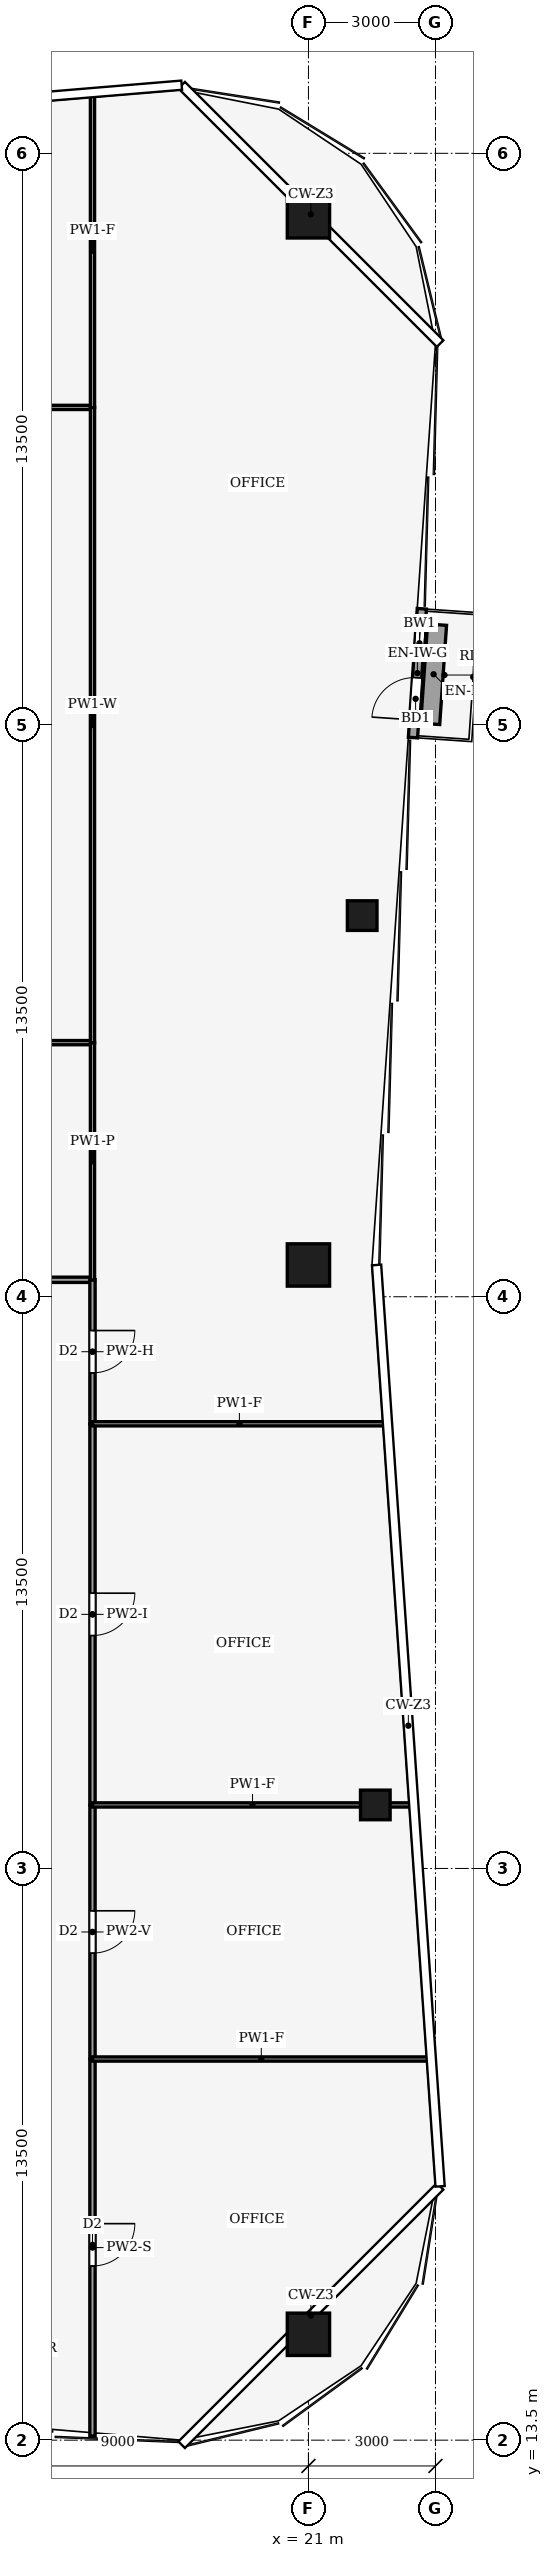
"""IFC4 building model, lengths in metres.
Left out: names, types, materials, properties, quantities, classifications, styles, units other than length and angle.
Written with IfcOpenShell. Run it as: python <this file> out.ifc"""

import sys

from ifc_helpers import new_model, si_unit, direction, frame, frame_2d, origin, origin_2d, place, context, subcontext, project, spatial, rectangle, hollow_rectangle, extrude, element, fill, save


model = new_model("IFC4")
c1 = context("Model", 3, precision=1e-05, world=origin(), true_north=direction((0.0, 1.0)))
c2 = subcontext(c1, "Body", "Model", "MODEL_VIEW")
j1 = project(units=[si_unit("LENGTHUNIT", "METRE"), si_unit("PLANEANGLEUNIT", "RADIAN")], contexts=[c1])
p1 = place(None, origin())
s1 = spatial("IfcSite", under=j1, at=p1, CompositionType="ELEMENT")
p2 = place(p1, origin())
s2 = spatial("IfcBuilding", under=s1, at=p2, CompositionType="ELEMENT")
p3 = place(p2, frame((0.0, 0.0, 198.0)))
s3 = spatial("IfcBuildingStorey", under=s2, at=p3, CompositionType="ELEMENT", Elevation=198.0)
for number, where, z_axis, x_axis in (
    (1, (21.0, 66.0, 0.0), (0.0, 0.0, 1.0), (1.0, 0.0, 0.0)),
    (2, (21.0, 41.25, 0.0), (0.0, 0.0, 1.0), (1.0, 0.0, 0.0)),
    (3, (21.0, 16.0, 0.0), (0.0, 0.0, 1.0), (1.0, 0.0, 0.0)),
):
    element("IfcColumn", number, at=place(p3, frame(where, z_axis=z_axis, x_axis=x_axis)), inside=s3, PredefinedType="COLUMN", context=c2, shape_type="SweptSolid", body=[
        extrude(hollow_rectangle(XDim=1.0, YDim=1.0, WallThickness=0.06, at=origin_2d()), origin(), (0.0, 0.0, 1.0), 4.0),
    ])
for number, where, z_axis, x_axis in (
    (4, (22.579, 28.5, 0.0), (0.0, 0.0, 1.0), (1.0, 0.0, 0.0)),
    (5, (22.269, 49.5, 0.0), (0.0, 0.0, 1.0), (1.0, 0.0, 0.0)),
):
    element("IfcColumn", number, at=place(p3, frame(where, z_axis=z_axis, x_axis=x_axis)), inside=s3, PredefinedType="COLUMN", context=c2, shape_type="SweptSolid", body=[
        extrude(hollow_rectangle(XDim=0.7, YDim=0.7, WallThickness=0.03, at=origin_2d()), origin(), (0.0, 0.0, 1.0), 4.0),
    ])
p4 = place(p3, frame((23.468, 53.704, 0.0), z_axis=(0.0, 0.0, 1.0), x_axis=(0.068793846076, 0.997630897047, 0.0)))
e6 = element("IfcWall", 6, at=p4, inside=s3, PredefinedType="SOLIDWALL", context=c2, shape_type="SweptSolid", body=[
    extrude(rectangle(XDim=3.049, YDim=0.218, at=frame_2d((1.524, 0.0))), origin(), (0.0, 0.0, 1.0), 3.65),
])
p5 = place(p4, frame((0.416, 0.0, 0.0)))
e7 = element("IfcOpeningElement", 7, at=p5, cuts=e6, PredefinedType="OPENING", context=c2, shape_type="SweptSolid", body=[
    extrude(rectangle(XDim=1.0, YDim=2.1, at=frame_2d((0.5, 1.05))), frame((0.0, 0.119, 0.0), z_axis=(0.0, -1.0, 0.0), x_axis=(1.0, 0.0, 0.0)), (0.0, 0.0, 1.0), 0.238),
])
p6 = place(p4, frame((1.832, 0.0, 0.9)))
e8 = element("IfcOpeningElement", 8, at=p6, cuts=e6, PredefinedType="OPENING", context=c2, shape_type="SweptSolid", body=[
    extrude(rectangle(XDim=0.8, YDim=1.2, at=frame_2d((0.4, 0.6))), frame((0.0, 0.119, 0.0), z_axis=(0.0, -1.0, 0.0), x_axis=(1.0, 0.0, 0.0)), (0.0, 0.0, 1.0), 0.238),
])
p7 = place(p3, frame((23.875, 54.027, 0.0), z_axis=(0.0, 0.0, 1.0), x_axis=(0.068823499363, 0.997628851796, 0.0)))
e9 = element("IfcWall", 9, at=p7, inside=s3, PredefinedType="USERDEFINED", context=c2, shape_type="SweptSolid", body=[
    extrude(rectangle(XDim=2.348, YDim=0.45, at=frame_2d((1.174, 0.0))), origin(), (0.0, 0.0, 1.0), 0.4),
])
p8 = place(p3, frame((9.0, 40.9, 0.0), z_axis=(0.0, 0.0, 1.0), x_axis=(1.0, 0.0, 0.0)))
e10 = element("IfcWall", 10, at=p8, inside=s3, PredefinedType="PARTITIONING", context=c2, shape_type="SweptSolid", body=[
    extrude(rectangle(XDim=6.9, YDim=0.125, at=frame_2d((3.45, 0.0))), origin(), (0.0, 0.0, 1.0), 3.44),
])
p9 = place(p8, frame((2.95, 0.0, 0.0)))
e11 = element("IfcOpeningElement", 11, at=p9, cuts=e10, PredefinedType="OPENING", context=c2, shape_type="SweptSolid", body=[
    extrude(rectangle(XDim=1.0, YDim=2.1, at=frame_2d((0.5, 1.05))), frame((0.0, 0.073, 0.0), z_axis=(0.0, -1.0, 0.0), x_axis=(1.0, 0.0, 0.0)), (0.0, 0.0, 1.0), 0.145),
])
p10 = place(p3, frame((15.9, 22.5, 0.0), z_axis=(0.0, 0.0, 1.0), x_axis=(0.0, -1.0, 0.0)))
e12 = element("IfcWall", 12, at=p10, inside=s3, PredefinedType="PARTITIONING", context=c2, shape_type="SweptSolid", body=[
    extrude(rectangle(XDim=8.905, YDim=0.125, at=frame_2d((4.453, 0.0))), origin(), (0.0, 0.0, 1.0), 3.04),
])
p11 = place(p10, frame((3.887, 0.0, 0.0)))
e13 = element("IfcOpeningElement", 13, at=p11, cuts=e12, PredefinedType="OPENING", context=c2, shape_type="SweptSolid", body=[
    extrude(rectangle(XDim=1.0, YDim=2.1, at=frame_2d((0.5, 1.05))), frame((0.0, 0.073, 0.0), z_axis=(0.0, -1.0, 0.0), x_axis=(1.0, 0.0, 0.0)), (0.0, 0.0, 1.0), 0.145),
])
p12 = place(p3, frame((15.9, 28.5, 0.0), z_axis=(0.0, 0.0, 1.0), x_axis=(0.0, -1.0, 0.0)))
e14 = element("IfcWall", 14, at=p12, inside=s3, PredefinedType="PARTITIONING", context=c2, shape_type="SweptSolid", body=[
    extrude(rectangle(XDim=6.0, YDim=0.125, at=frame_2d((3.0, 0.0))), origin(), (0.0, 0.0, 1.0), 3.44),
])
p13 = place(p12, frame((2.5, 0.0, 0.0)))
e15 = element("IfcOpeningElement", 15, at=p13, cuts=e14, PredefinedType="OPENING", context=c2, shape_type="SweptSolid", body=[
    extrude(rectangle(XDim=1.0, YDim=2.1, at=frame_2d((0.5, 1.05))), frame((0.0, 0.073, 0.0), z_axis=(0.0, -1.0, 0.0), x_axis=(1.0, 0.0, 0.0)), (0.0, 0.0, 1.0), 0.145),
])
p14 = place(p3, frame((15.9, 37.5, 0.0), z_axis=(0.0, 0.0, 1.0), x_axis=(0.0, -1.0, 0.0)))
e16 = element("IfcWall", 16, at=p14, inside=s3, PredefinedType="PARTITIONING", context=c2, shape_type="SweptSolid", body=[
    extrude(rectangle(XDim=9.0, YDim=0.125, at=frame_2d((4.5, 0.0))), origin(), (0.0, 0.0, 1.0), 3.48),
])
p15 = place(p14, frame((4.0, 0.0, 0.0)))
e17 = element("IfcOpeningElement", 17, at=p15, cuts=e16, PredefinedType="OPENING", context=c2, shape_type="SweptSolid", body=[
    extrude(rectangle(XDim=1.0, YDim=2.1, at=frame_2d((0.5, 1.05))), frame((0.0, 0.073, 0.0), z_axis=(0.0, -1.0, 0.0), x_axis=(1.0, 0.0, 0.0)), (0.0, 0.0, 1.0), 0.145),
])
p16 = place(p3, frame((15.9, 40.904, 0.0), z_axis=(0.0, 0.0, 1.0), x_axis=(0.0, -1.0, 0.0)))
e18 = element("IfcWall", 18, at=p16, inside=s3, PredefinedType="PARTITIONING", context=c2, shape_type="SweptSolid", body=[
    extrude(rectangle(XDim=3.404, YDim=0.125, at=frame_2d((1.702, 0.0))), origin(), (0.0, 0.0, 1.0), 3.14),
])
p17 = place(p16, frame((1.202, 0.0, 0.0)))
e19 = element("IfcOpeningElement", 19, at=p17, cuts=e18, PredefinedType="OPENING", context=c2, shape_type="SweptSolid", body=[
    extrude(rectangle(XDim=1.0, YDim=2.1, at=frame_2d((0.5, 1.05))), frame((0.0, 0.073, 0.0), z_axis=(0.0, -1.0, 0.0), x_axis=(1.0, 0.0, 0.0)), (0.0, 0.0, 1.0), 0.145),
])
p18 = place(p3, frame((15.9, 46.5, 0.0), z_axis=(0.0, 0.0, 1.0), x_axis=(-1.0, 0.0, 0.0)))
e20 = element("IfcWall", 20, at=p18, inside=s3, PredefinedType="PARTITIONING", context=c2, shape_type="SweptSolid", body=[
    extrude(rectangle(XDim=6.904, YDim=0.1, at=frame_2d((3.452, 0.0))), origin(), (0.0, 0.0, 1.0), 3.44),
])
p19 = place(p3, frame((15.9, 40.896, 0.0), z_axis=(0.0, 0.0, 1.0), x_axis=(0.0, 1.0, 0.0)))
e21 = element("IfcWall", 21, at=p19, inside=s3, PredefinedType="PARTITIONING", context=c2, shape_type="SweptSolid", body=[
    extrude(rectangle(XDim=5.608, YDim=0.1, at=frame_2d((2.804, 0.0))), origin(), (0.0, 0.0, 1.0), 3.44),
])
p20 = place(p3, frame((9.0, 61.5, 0.0), z_axis=(0.0, 0.0, 1.0), x_axis=(1.0, 0.0, 0.0)))
e22 = element("IfcWall", 22, at=p20, inside=s3, PredefinedType="PARTITIONING", context=c2, shape_type="SweptSolid", body=[
    extrude(rectangle(XDim=6.9, YDim=0.1, at=frame_2d((3.45, 0.0))), origin(), (0.0, 0.0, 1.0), 3.24),
])
p21 = place(p20, frame((2.95, 0.0, 0.0)))
e23 = element("IfcOpeningElement", 23, at=p21, cuts=e22, PredefinedType="OPENING", context=c2, shape_type="SweptSolid", body=[
    extrude(rectangle(XDim=1.0, YDim=2.1, at=frame_2d((0.5, 1.05))), frame((0.0, 0.06, 0.0), z_axis=(0.0, -1.0, 0.0), x_axis=(1.0, 0.0, 0.0)), (0.0, 0.0, 1.0), 0.12),
])
p22 = place(p3, frame((15.9, 46.496, 0.0), z_axis=(0.0, 0.0, 1.0), x_axis=(0.0, 1.0, 0.0)))
e24 = element("IfcWall", 24, at=p22, inside=s3, PredefinedType="PARTITIONING", context=c2, shape_type="SweptSolid", body=[
    extrude(rectangle(XDim=15.008, YDim=0.1, at=frame_2d((7.504, 0.0))), origin(), (0.0, 0.0, 1.0), 3.24),
])
p23 = place(p3, frame((15.9, 61.496, 0.0), z_axis=(0.0, 0.0, 1.0), x_axis=(0.0, 1.0, 0.0)))
e25 = element("IfcWall", 25, at=p23, inside=s3, PredefinedType="PARTITIONING", context=c2, shape_type="SweptSolid", body=[
    extrude(rectangle(XDim=7.409, YDim=0.1, at=frame_2d((3.705, 0.0))), origin(), (0.0, 0.0, 1.0), 3.04),
])
p24 = place(p3, frame((23.873, 22.5, 0.0), z_axis=(0.0, 0.0, 1.0), x_axis=(-1.0, 0.0, 0.0)))
e26 = element("IfcWall", 26, at=p24, inside=s3, PredefinedType="PARTITIONING", context=c2, shape_type="SweptSolid", body=[
    extrude(rectangle(XDim=7.973, YDim=0.1, at=frame_2d((3.987, 0.0))), origin(), (0.0, 0.0, 1.0), 3.04),
])
p25 = place(p3, frame((23.459, 28.5, 0.0), z_axis=(0.0, 0.0, 1.0), x_axis=(-1.0, 0.0, 0.0)))
e27 = element("IfcWall", 27, at=p25, inside=s3, PredefinedType="PARTITIONING", context=c2, shape_type="SweptSolid", body=[
    extrude(rectangle(XDim=7.559, YDim=0.1, at=frame_2d((3.78, 0.0))), origin(), (0.0, 0.0, 1.0), 3.04),
])
p26 = place(p3, frame((22.839, 37.5, 0.0), z_axis=(0.0, 0.0, 1.0), x_axis=(-1.0, 0.0, 0.0)))
e28 = element("IfcWall", 28, at=p26, inside=s3, PredefinedType="PARTITIONING", context=c2, shape_type="SweptSolid", body=[
    extrude(rectangle(XDim=6.939, YDim=0.1, at=frame_2d((3.469, 0.0))), origin(), (0.0, 0.0, 1.0), 3.04),
])
p27 = place(p5, origin())
e29 = element("IfcDoor", 29, at=p27, inside=s3, OperationType="SINGLE_SWING_LEFT", PredefinedType="DOOR", context=c2, shape_type="SweptSolid", body=[
    extrude(rectangle(XDim=1.0, YDim=2.1, at=frame_2d((0.5, 1.05))), frame((0.0, 0.025, 0.0), z_axis=(0.0, -1.0, 0.0), x_axis=(1.0, 0.0, 0.0)), (0.0, 0.0, 1.0), 0.05),
])
fill(e7, e29)
p28 = place(p6, origin())
e30 = element("IfcWindow", 30, at=p28, inside=s3, PartitioningType="SINGLE_PANEL", PredefinedType="WINDOW", context=c2, shape_type="SweptSolid", body=[
    extrude(rectangle(XDim=0.8, YDim=1.2, at=frame_2d((0.4, 0.6))), frame((0.0, 0.03, 0.0), z_axis=(0.0, -1.0, 0.0), x_axis=(1.0, 0.0, 0.0)), (0.0, 0.0, 1.0), 0.06),
])
fill(e8, e30)
p29 = place(p11, origin())
e31 = element("IfcDoor", 31, at=p29, inside=s3, OperationType="SINGLE_SWING_LEFT", PredefinedType="DOOR", context=c2, shape_type="SweptSolid", body=[
    extrude(rectangle(XDim=1.0, YDim=2.1, at=frame_2d((0.5, 1.05))), frame((0.0, 0.025, 0.0), z_axis=(0.0, -1.0, 0.0), x_axis=(1.0, 0.0, 0.0)), (0.0, 0.0, 1.0), 0.05),
])
fill(e13, e31)
p30 = place(p13, origin())
e32 = element("IfcDoor", 32, at=p30, inside=s3, OperationType="SINGLE_SWING_LEFT", PredefinedType="DOOR", context=c2, shape_type="SweptSolid", body=[
    extrude(rectangle(XDim=1.0, YDim=2.1, at=frame_2d((0.5, 1.05))), frame((0.0, 0.025, 0.0), z_axis=(0.0, -1.0, 0.0), x_axis=(1.0, 0.0, 0.0)), (0.0, 0.0, 1.0), 0.05),
])
fill(e15, e32)
p31 = place(p15, origin())
e33 = element("IfcDoor", 33, at=p31, inside=s3, OperationType="SINGLE_SWING_RIGHT", PredefinedType="DOOR", context=c2, shape_type="SweptSolid", body=[
    extrude(rectangle(XDim=1.0, YDim=2.1, at=frame_2d((0.5, 1.05))), frame((0.0, 0.025, 0.0), z_axis=(0.0, -1.0, 0.0), x_axis=(1.0, 0.0, 0.0)), (0.0, 0.0, 1.0), 0.05),
])
fill(e17, e33)
p32 = place(p17, origin())
e34 = element("IfcDoor", 34, at=p32, inside=s3, OperationType="SINGLE_SWING_LEFT", PredefinedType="DOOR", context=c2, shape_type="SweptSolid", body=[
    extrude(rectangle(XDim=1.0, YDim=2.1, at=frame_2d((0.5, 1.05))), frame((0.0, 0.025, 0.0), z_axis=(0.0, -1.0, 0.0), x_axis=(1.0, 0.0, 0.0)), (0.0, 0.0, 1.0), 0.05),
])
fill(e19, e34)
save(model, sys.argv[1])
